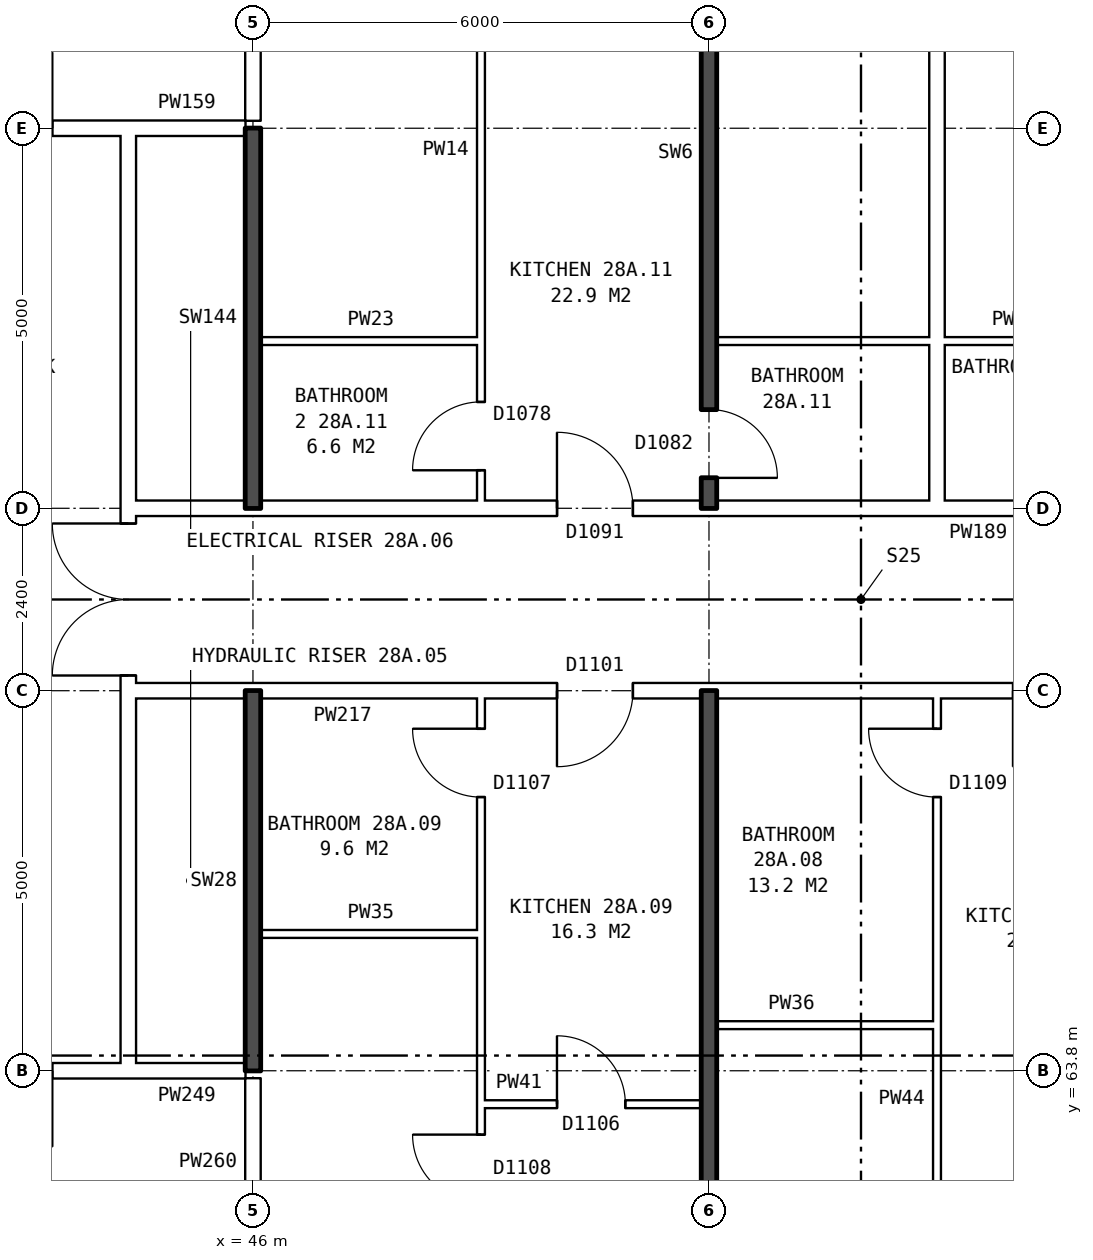
"""IFC4 building model, lengths in metres.
Left out: names, types, materials, properties, quantities, classifications, styles, units other than length and angle.
Written with IfcOpenShell. Run it as: python <this file> out.ifc"""

import sys

from ifc_helpers import new_model, si_unit, direction, frame, frame_2d, origin, place, context, subcontext, project, spatial, rectangle, extrude, element, fill, save


model = new_model("IFC4")
c1 = context("Model", 3, precision=1e-05, world=origin(), true_north=direction((0.0, 1.0)))
c2 = subcontext(c1, "Body", "Model", "MODEL_VIEW")
j1 = project(units=[si_unit("LENGTHUNIT", "METRE"), si_unit("PLANEANGLEUNIT", "RADIAN")], contexts=[c1])
p1 = place(None, origin())
s1 = spatial("IfcSite", under=j1, at=p1, CompositionType="ELEMENT")
p2 = place(p1, origin())
s2 = spatial("IfcBuilding", under=s1, at=p2, CompositionType="ELEMENT")
p3 = place(p2, frame((0.0, 0.0, 102.6)))
s3 = spatial("IfcBuildingStorey", under=s2, at=p3, CompositionType="ELEMENT", Elevation=102.6)
p4 = place(p3, frame((44.36, 63.9, 0.0), z_axis=(0.0, 0.0, 1.0), x_axis=(0.0, 1.0, 0.0)))
e1 = element("IfcWall", 1, at=p4, inside=s3, PredefinedType="PARTITIONING", context=c2, shape_type="SweptSolid", body=[
    extrude(rectangle(XDim=12.2, YDim=0.2, at=frame_2d((6.1, 0.0))), origin(), (0.0, 0.0, 1.0), 2.85),
])
p5 = place(p4, frame((5.1, 0.0, 0.0)))
e2 = element("IfcOpeningElement", 2, at=p5, cuts=e1, PredefinedType="OPENING", context=c2, shape_type="SweptSolid", body=[
    extrude(rectangle(XDim=2.0, YDim=2.1, at=frame_2d((1.0, 1.05))), frame((0.0, 0.11, 0.0), z_axis=(0.0, -1.0, 0.0), x_axis=(1.0, 0.0, 0.0)), (0.0, 0.0, 1.0), 0.22),
])
p6 = place(p3, frame((49.0, 63.36, 0.0), z_axis=(0.0, 0.0, 1.0), x_axis=(1.0, 0.0, 0.0)))
e3 = element("IfcWall", 3, at=p6, inside=s3, PredefinedType="PARTITIONING", context=c2, shape_type="SweptSolid", body=[
    extrude(rectangle(XDim=2.9, YDim=0.1, at=frame_2d((1.45, 0.0))), origin(), (0.0, 0.0, 1.0), 2.85),
])
p7 = place(p6, frame((1.0, 0.0, 0.0)))
e4 = element("IfcOpeningElement", 4, at=p7, cuts=e3, PredefinedType="OPENING", context=c2, shape_type="SweptSolid", body=[
    extrude(rectangle(XDim=0.9, YDim=2.1, at=frame_2d((0.45, 1.05))), frame((0.0, 0.06, 0.0), z_axis=(0.0, -1.0, 0.0), x_axis=(1.0, 0.0, 0.0)), (0.0, 0.0, 1.0), 0.12),
])
p8 = place(p3, frame((41.36, 63.8, 0.0), z_axis=(0.0, 0.0, 1.0), x_axis=(1.0, 0.0, 0.0)))
e5 = element("IfcWall", 5, at=p8, inside=s3, PredefinedType="PARTITIONING", context=c2, shape_type="SweptSolid", body=[
    extrude(rectangle(XDim=3.0, YDim=0.2, at=frame_2d((1.5, 0.0))), origin(), (0.0, 0.0, 1.0), 2.85),
])
p9 = place(p8, frame((1.0, 0.0, 0.0)))
e6 = element("IfcOpeningElement", 6, at=p9, cuts=e5, PredefinedType="OPENING", context=c2, shape_type="SweptSolid", body=[
    extrude(rectangle(XDim=1.0, YDim=2.1, at=frame_2d((0.5, 1.05))), frame((0.0, 0.11, 0.0), z_axis=(0.0, -1.0, 0.0), x_axis=(1.0, 0.0, 0.0)), (0.0, 0.0, 1.0), 0.22),
])
p10 = place(p3, frame((44.36, 63.8, 0.0), z_axis=(0.0, 0.0, 1.0), x_axis=(1.0, 0.0, 0.0)))
e7 = element("IfcWall", 7, at=p10, inside=s3, PredefinedType="PARTITIONING", context=c2, shape_type="SweptSolid", body=[
    extrude(rectangle(XDim=1.54, YDim=0.2, at=frame_2d((0.77, 0.0))), origin(), (0.0, 0.0, 1.0), 2.85),
])
for number, where, z_axis, x_axis in (
    (8, (52.1, 64.4, 0.0), (0.0, 0.0, 1.0), (1.0, 0.0, 0.0)),
    (9, (46.1, 65.6, 0.0), (0.0, 0.0, 1.0), (1.0, 0.0, 0.0)),
):
    element("IfcWall", number, at=place(p3, frame(where, z_axis=z_axis, x_axis=x_axis)), inside=s3, PredefinedType="PARTITIONING", context=c2, shape_type="SweptSolid", body=[
        extrude(rectangle(XDim=2.9, YDim=0.1, at=frame_2d((1.45, 0.0))), origin(), (0.0, 0.0, 1.0), 2.85),
    ])
p11 = place(p3, frame((44.36, 68.8, 0.0), z_axis=(0.0, 0.0, 1.0), x_axis=(1.0, 0.0, 0.0)))
e10 = element("IfcWall", 10, at=p11, inside=s3, PredefinedType="PARTITIONING", context=c2, shape_type="SweptSolid", body=[
    extrude(rectangle(XDim=19.28, YDim=0.2, at=frame_2d((9.64, 0.0))), origin(), (0.0, 0.0, 1.0), 2.85),
])
p12 = place(p11, frame((14.64, 0.0, 0.0)))
e11 = element("IfcOpeningElement", 11, at=p12, cuts=e10, PredefinedType="OPENING", context=c2, shape_type="SweptSolid", body=[
    extrude(rectangle(XDim=1.0, YDim=2.1, at=frame_2d((0.5, 1.05))), frame((0.0, 0.11, 0.0), z_axis=(0.0, -1.0, 0.0), x_axis=(1.0, 0.0, 0.0)), (0.0, 0.0, 1.0), 0.22),
])
p13 = place(p11, frame((11.64, 0.0, 0.0)))
e12 = element("IfcOpeningElement", 12, at=p13, cuts=e10, PredefinedType="OPENING", context=c2, shape_type="SweptSolid", body=[
    extrude(rectangle(XDim=1.0, YDim=2.1, at=frame_2d((0.5, 1.05))), frame((0.0, 0.11, 0.0), z_axis=(0.0, -1.0, 0.0), x_axis=(1.0, 0.0, 0.0)), (0.0, 0.0, 1.0), 0.22),
])
p14 = place(p11, frame((5.64, 0.0, 0.0)))
e13 = element("IfcOpeningElement", 13, at=p14, cuts=e10, PredefinedType="OPENING", context=c2, shape_type="SweptSolid", body=[
    extrude(rectangle(XDim=1.0, YDim=2.1, at=frame_2d((0.5, 1.05))), frame((0.0, 0.11, 0.0), z_axis=(0.0, -1.0, 0.0), x_axis=(1.0, 0.0, 0.0)), (0.0, 0.0, 1.0), 0.22),
])
p15 = place(p3, frame((44.36, 71.2, 0.0), z_axis=(0.0, 0.0, 1.0), x_axis=(1.0, 0.0, 0.0)))
e14 = element("IfcWall", 14, at=p15, inside=s3, PredefinedType="PARTITIONING", context=c2, shape_type="SweptSolid", body=[
    extrude(rectangle(XDim=19.28, YDim=0.2, at=frame_2d((9.64, 0.0))), origin(), (0.0, 0.0, 1.0), 2.85),
])
p16 = place(p15, frame((14.64, 0.0, 0.0)))
e15 = element("IfcOpeningElement", 15, at=p16, cuts=e14, PredefinedType="OPENING", context=c2, shape_type="SweptSolid", body=[
    extrude(rectangle(XDim=1.0, YDim=2.1, at=frame_2d((0.5, 1.05))), frame((0.0, 0.11, 0.0), z_axis=(0.0, -1.0, 0.0), x_axis=(1.0, 0.0, 0.0)), (0.0, 0.0, 1.0), 0.22),
])
p17 = place(p15, frame((5.64, 0.0, 0.0)))
e16 = element("IfcOpeningElement", 16, at=p17, cuts=e14, PredefinedType="OPENING", context=c2, shape_type="SweptSolid", body=[
    extrude(rectangle(XDim=1.0, YDim=2.1, at=frame_2d((0.5, 1.05))), frame((0.0, 0.11, 0.0), z_axis=(0.0, -1.0, 0.0), x_axis=(1.0, 0.0, 0.0)), (0.0, 0.0, 1.0), 0.22),
])
p18 = place(p3, frame((46.1, 73.4, 0.0), z_axis=(0.0, 0.0, 1.0), x_axis=(1.0, 0.0, 0.0)))
e17 = element("IfcWall", 17, at=p18, inside=s3, PredefinedType="PARTITIONING", context=c2, shape_type="SweptSolid", body=[
    extrude(rectangle(XDim=2.9, YDim=0.1, at=frame_2d((1.45, 0.0))), origin(), (0.0, 0.0, 1.0), 2.85),
])
p19 = place(p3, frame((52.1, 73.4, 0.0), z_axis=(0.0, 0.0, 1.0), x_axis=(1.0, 0.0, 0.0)))
e18 = element("IfcWall", 18, at=p19, inside=s3, PredefinedType="PARTITIONING", context=c2, shape_type="SweptSolid", body=[
    extrude(rectangle(XDim=5.8, YDim=0.1, at=frame_2d((2.9, 0.0))), origin(), (0.0, 0.0, 1.0), 2.85),
])
p20 = place(p3, frame((41.36, 76.2, 0.0), z_axis=(0.0, 0.0, 1.0), x_axis=(1.0, 0.0, 0.0)))
e19 = element("IfcWall", 19, at=p20, inside=s3, PredefinedType="PARTITIONING", context=c2, shape_type="SweptSolid", body=[
    extrude(rectangle(XDim=3.0, YDim=0.2, at=frame_2d((1.5, 0.0))), origin(), (0.0, 0.0, 1.0), 2.85),
])
p21 = place(p20, frame((1.0, 0.0, 0.0)))
e20 = element("IfcOpeningElement", 20, at=p21, cuts=e19, PredefinedType="OPENING", context=c2, shape_type="SweptSolid", body=[
    extrude(rectangle(XDim=1.0, YDim=2.1, at=frame_2d((0.5, 1.05))), frame((0.0, 0.11, 0.0), z_axis=(0.0, -1.0, 0.0), x_axis=(1.0, 0.0, 0.0)), (0.0, 0.0, 1.0), 0.22),
])
p22 = place(p3, frame((44.36, 76.2, 0.0), z_axis=(0.0, 0.0, 1.0), x_axis=(1.0, 0.0, 0.0)))
e21 = element("IfcWall", 21, at=p22, inside=s3, PredefinedType="PARTITIONING", context=c2, shape_type="SweptSolid", body=[
    extrude(rectangle(XDim=1.54, YDim=0.2, at=frame_2d((0.77, 0.0))), origin(), (0.0, 0.0, 1.0), 2.85),
])
p23 = place(p3, frame((46.0, 61.5, 0.0), z_axis=(0.0, 0.0, 1.0), x_axis=(0.0, 1.0, 0.0)))
e22 = element("IfcWall", 22, at=p23, inside=s3, PredefinedType="PARTITIONING", context=c2, shape_type="SweptSolid", body=[
    extrude(rectangle(XDim=2.2, YDim=0.2, at=frame_2d((1.1, 0.0))), origin(), (0.0, 0.0, 1.0), 2.85),
])
for number, where, z_axis, x_axis in (
    (23, (46.0, 63.8, 0.0), (0.0, 0.0, 1.0), (0.0, 1.0, 0.0)),
    (24, (46.0, 71.2, 0.0), (0.0, 0.0, 1.0), (0.0, 1.0, 0.0)),
):
    element("IfcWall", number, at=place(p3, frame(where, z_axis=z_axis, x_axis=x_axis)), inside=s3, PredefinedType="SOLIDWALL", context=c2, shape_type="SweptSolid", body=[
        extrude(rectangle(XDim=5.0, YDim=0.2, at=frame_2d((2.5, 0.0))), origin(), (0.0, 0.0, 1.0), 2.85),
    ])
p24 = place(p3, frame((46.0, 76.3, 0.0), z_axis=(0.0, 0.0, 1.0), x_axis=(0.0, 1.0, 0.0)))
e25 = element("IfcWall", 25, at=p24, inside=s3, PredefinedType="PARTITIONING", context=c2, shape_type="SweptSolid", body=[
    extrude(rectangle(XDim=2.2, YDim=0.2, at=frame_2d((1.1, 0.0))), origin(), (0.0, 0.0, 1.0), 2.85),
])
p25 = place(p3, frame((49.0, 54.36, 0.0), z_axis=(0.0, 0.0, 1.0), x_axis=(0.0, 1.0, 0.0)))
e26 = element("IfcWall", 26, at=p25, inside=s3, PredefinedType="PARTITIONING", context=c2, shape_type="SweptSolid", body=[
    extrude(rectangle(XDim=14.34, YDim=0.1, at=frame_2d((7.17, 0.0))), origin(), (0.0, 0.0, 1.0), 2.85),
])
p26 = place(p25, frame((7.7, 0.0, 0.0)))
e27 = element("IfcOpeningElement", 27, at=p26, cuts=e26, PredefinedType="OPENING", context=c2, shape_type="SweptSolid", body=[
    extrude(rectangle(XDim=0.9, YDim=2.1, at=frame_2d((0.45, 1.05))), frame((0.0, 0.06, 0.0), z_axis=(0.0, -1.0, 0.0), x_axis=(1.0, 0.0, 0.0)), (0.0, 0.0, 1.0), 0.12),
])
p27 = place(p25, frame((13.04, 0.0, 0.0)))
e28 = element("IfcOpeningElement", 28, at=p27, cuts=e26, PredefinedType="OPENING", context=c2, shape_type="SweptSolid", body=[
    extrude(rectangle(XDim=0.9, YDim=2.1, at=frame_2d((0.45, 1.05))), frame((0.0, 0.06, 0.0), z_axis=(0.0, -1.0, 0.0), x_axis=(1.0, 0.0, 0.0)), (0.0, 0.0, 1.0), 0.12),
])
p28 = place(p3, frame((49.0, 71.3, 0.0), z_axis=(0.0, 0.0, 1.0), x_axis=(0.0, 1.0, 0.0)))
e29 = element("IfcWall", 29, at=p28, inside=s3, PredefinedType="PARTITIONING", context=c2, shape_type="SweptSolid", body=[
    extrude(rectangle(XDim=14.34, YDim=0.1, at=frame_2d((7.17, 0.0))), origin(), (0.0, 0.0, 1.0), 2.85),
])
p29 = place(p28, frame((7.94, 0.0, 0.0)))
e30 = element("IfcOpeningElement", 30, at=p29, cuts=e29, PredefinedType="OPENING", context=c2, shape_type="SweptSolid", body=[
    extrude(rectangle(XDim=0.9, YDim=2.1, at=frame_2d((0.45, 1.05))), frame((0.0, 0.06, 0.0), z_axis=(0.0, -1.0, 0.0), x_axis=(1.0, 0.0, 0.0)), (0.0, 0.0, 1.0), 0.12),
])
p30 = place(p28, frame((0.4, 0.0, 0.0)))
e31 = element("IfcOpeningElement", 31, at=p30, cuts=e29, PredefinedType="OPENING", context=c2, shape_type="SweptSolid", body=[
    extrude(rectangle(XDim=0.9, YDim=2.1, at=frame_2d((0.45, 1.05))), frame((0.0, 0.06, 0.0), z_axis=(0.0, -1.0, 0.0), x_axis=(1.0, 0.0, 0.0)), (0.0, 0.0, 1.0), 0.12),
])
p31 = place(p3, frame((52.0, 54.36, 0.0), z_axis=(0.0, 0.0, 1.0), x_axis=(0.0, 1.0, 0.0)))
e32 = element("IfcWall", 32, at=p31, inside=s3, PredefinedType="SOLIDWALL", context=c2, shape_type="SweptSolid", body=[
    extrude(rectangle(XDim=14.44, YDim=0.2, at=frame_2d((7.22, 0.0))), origin(), (0.0, 0.0, 1.0), 2.85),
])
p32 = place(p3, frame((52.0, 71.2, 0.0), z_axis=(0.0, 0.0, 1.0), x_axis=(0.0, 1.0, 0.0)))
e33 = element("IfcWall", 33, at=p32, inside=s3, PredefinedType="SOLIDWALL", context=c2, shape_type="SweptSolid", body=[
    extrude(rectangle(XDim=14.44, YDim=0.2, at=frame_2d((7.22, 0.0))), origin(), (0.0, 0.0, 1.0), 2.85),
])
p33 = place(p32, frame((8.04, 0.0, 0.0)))
e34 = element("IfcOpeningElement", 34, at=p33, cuts=e33, PredefinedType="OPENING", context=c2, shape_type="SweptSolid", body=[
    extrude(rectangle(XDim=0.9, YDim=2.1, at=frame_2d((0.45, 1.05))), frame((0.0, 0.11, 0.0), z_axis=(0.0, -1.0, 0.0), x_axis=(1.0, 0.0, 0.0)), (0.0, 0.0, 1.0), 0.22),
])
p34 = place(p32, frame((0.4, 0.0, 0.0)))
e35 = element("IfcOpeningElement", 35, at=p34, cuts=e33, PredefinedType="OPENING", context=c2, shape_type="SweptSolid", body=[
    extrude(rectangle(XDim=0.9, YDim=2.1, at=frame_2d((0.45, 1.05))), frame((0.0, 0.11, 0.0), z_axis=(0.0, -1.0, 0.0), x_axis=(1.0, 0.0, 0.0)), (0.0, 0.0, 1.0), 0.22),
])
p35 = place(p3, frame((55.0, 54.36, 0.0), z_axis=(0.0, 0.0, 1.0), x_axis=(0.0, 1.0, 0.0)))
e36 = element("IfcWall", 36, at=p35, inside=s3, PredefinedType="PARTITIONING", context=c2, shape_type="SweptSolid", body=[
    extrude(rectangle(XDim=14.34, YDim=0.1, at=frame_2d((7.17, 0.0))), origin(), (0.0, 0.0, 1.0), 2.85),
])
p36 = place(p35, frame((4.2, 0.0, 0.0)))
e37 = element("IfcOpeningElement", 37, at=p36, cuts=e36, PredefinedType="OPENING", context=c2, shape_type="SweptSolid", body=[
    extrude(rectangle(XDim=0.9, YDim=2.1, at=frame_2d((0.45, 1.05))), frame((0.0, 0.06, 0.0), z_axis=(0.0, -1.0, 0.0), x_axis=(1.0, 0.0, 0.0)), (0.0, 0.0, 1.0), 0.12),
])
p37 = place(p35, frame((13.04, 0.0, 0.0)))
e38 = element("IfcOpeningElement", 38, at=p37, cuts=e36, PredefinedType="OPENING", context=c2, shape_type="SweptSolid", body=[
    extrude(rectangle(XDim=0.9, YDim=2.1, at=frame_2d((0.45, 1.05))), frame((0.0, 0.06, 0.0), z_axis=(0.0, -1.0, 0.0), x_axis=(1.0, 0.0, 0.0)), (0.0, 0.0, 1.0), 0.12),
])
p38 = place(p3, frame((55.0, 71.3, 0.0), z_axis=(0.0, 0.0, 1.0), x_axis=(0.0, 1.0, 0.0)))
e39 = element("IfcWall", 39, at=p38, inside=s3, PredefinedType="PARTITIONING", context=c2, shape_type="SweptSolid", body=[
    extrude(rectangle(XDim=14.34, YDim=0.2, at=frame_2d((7.17, 0.0))), origin(), (0.0, 0.0, 1.0), 2.85),
])
p39 = place(p5, origin())
e40 = element("IfcDoor", 40, at=p39, inside=s3, OperationType="DOUBLE_DOOR_SINGLE_SWING", PredefinedType="DOOR", context=c2, shape_type="SweptSolid", body=[
    extrude(rectangle(XDim=2.0, YDim=2.1, at=frame_2d((1.0, 1.05))), frame((0.0, 0.025, 0.0), z_axis=(0.0, -1.0, 0.0), x_axis=(1.0, 0.0, 0.0)), (0.0, 0.0, 1.0), 0.05),
])
fill(e2, e40)
p40 = place(p37, origin())
e41 = element("IfcDoor", 41, at=p40, inside=s3, OperationType="SINGLE_SWING_RIGHT", PredefinedType="DOOR", context=c2, shape_type="SweptSolid", body=[
    extrude(rectangle(XDim=0.9, YDim=2.1, at=frame_2d((0.45, 1.05))), frame((0.0, 0.025, 0.0), z_axis=(0.0, -1.0, 0.0), x_axis=(1.0, 0.0, 0.0)), (0.0, 0.0, 1.0), 0.05),
])
fill(e38, e41)
p41 = place(p26, origin())
e42 = element("IfcDoor", 42, at=p41, inside=s3, OperationType="SINGLE_SWING_RIGHT", PredefinedType="DOOR", context=c2, shape_type="SweptSolid", body=[
    extrude(rectangle(XDim=0.9, YDim=2.1, at=frame_2d((0.45, 1.05))), frame((0.0, 0.025, 0.0), z_axis=(0.0, -1.0, 0.0), x_axis=(1.0, 0.0, 0.0)), (0.0, 0.0, 1.0), 0.05),
])
fill(e27, e42)
p42 = place(p14, frame((1.0, 0.0, 0.0), z_axis=(0.0, 0.0, 1.0), x_axis=(-1.0, 0.0, 0.0)))
e43 = element("IfcDoor", 43, at=p42, inside=s3, OperationType="SINGLE_SWING_RIGHT", PredefinedType="DOOR", context=c2, shape_type="SweptSolid", body=[
    extrude(rectangle(XDim=1.0, YDim=2.1, at=frame_2d((0.5, 1.05))), frame((0.0, 0.025, 0.0), z_axis=(0.0, -1.0, 0.0), x_axis=(1.0, 0.0, 0.0)), (0.0, 0.0, 1.0), 0.05),
])
fill(e13, e43)
p43 = place(p7, origin())
e44 = element("IfcDoor", 44, at=p43, inside=s3, OperationType="SINGLE_SWING_LEFT", PredefinedType="DOOR", context=c2, shape_type="SweptSolid", body=[
    extrude(rectangle(XDim=0.9, YDim=2.1, at=frame_2d((0.45, 1.05))), frame((0.0, 0.025, 0.0), z_axis=(0.0, -1.0, 0.0), x_axis=(1.0, 0.0, 0.0)), (0.0, 0.0, 1.0), 0.05),
])
fill(e4, e44)
p44 = place(p27, origin())
e45 = element("IfcDoor", 45, at=p44, inside=s3, OperationType="SINGLE_SWING_RIGHT", PredefinedType="DOOR", context=c2, shape_type="SweptSolid", body=[
    extrude(rectangle(XDim=0.9, YDim=2.1, at=frame_2d((0.45, 1.05))), frame((0.0, 0.025, 0.0), z_axis=(0.0, -1.0, 0.0), x_axis=(1.0, 0.0, 0.0)), (0.0, 0.0, 1.0), 0.05),
])
fill(e28, e45)
p45 = place(p17, origin())
e46 = element("IfcDoor", 46, at=p45, inside=s3, OperationType="SINGLE_SWING_LEFT", PredefinedType="DOOR", context=c2, shape_type="SweptSolid", body=[
    extrude(rectangle(XDim=1.0, YDim=2.1, at=frame_2d((0.5, 1.05))), frame((0.0, 0.025, 0.0), z_axis=(0.0, -1.0, 0.0), x_axis=(1.0, 0.0, 0.0)), (0.0, 0.0, 1.0), 0.05),
])
fill(e16, e46)
p46 = place(p34, frame((0.9, 0.0, 0.0), z_axis=(0.0, 0.0, 1.0), x_axis=(-1.0, 0.0, 0.0)))
e47 = element("IfcDoor", 47, at=p46, inside=s3, OperationType="SINGLE_SWING_RIGHT", PredefinedType="DOOR", context=c2, shape_type="SweptSolid", body=[
    extrude(rectangle(XDim=0.9, YDim=2.1, at=frame_2d((0.45, 1.05))), frame((0.0, 0.025, 0.0), z_axis=(0.0, -1.0, 0.0), x_axis=(1.0, 0.0, 0.0)), (0.0, 0.0, 1.0), 0.05),
])
fill(e35, e47)
p47 = place(p30, origin())
e48 = element("IfcDoor", 48, at=p47, inside=s3, OperationType="SINGLE_SWING_LEFT", PredefinedType="DOOR", context=c2, shape_type="SweptSolid", body=[
    extrude(rectangle(XDim=0.9, YDim=2.1, at=frame_2d((0.45, 1.05))), frame((0.0, 0.025, 0.0), z_axis=(0.0, -1.0, 0.0), x_axis=(1.0, 0.0, 0.0)), (0.0, 0.0, 1.0), 0.05),
])
fill(e31, e48)
save(model, sys.argv[1])
